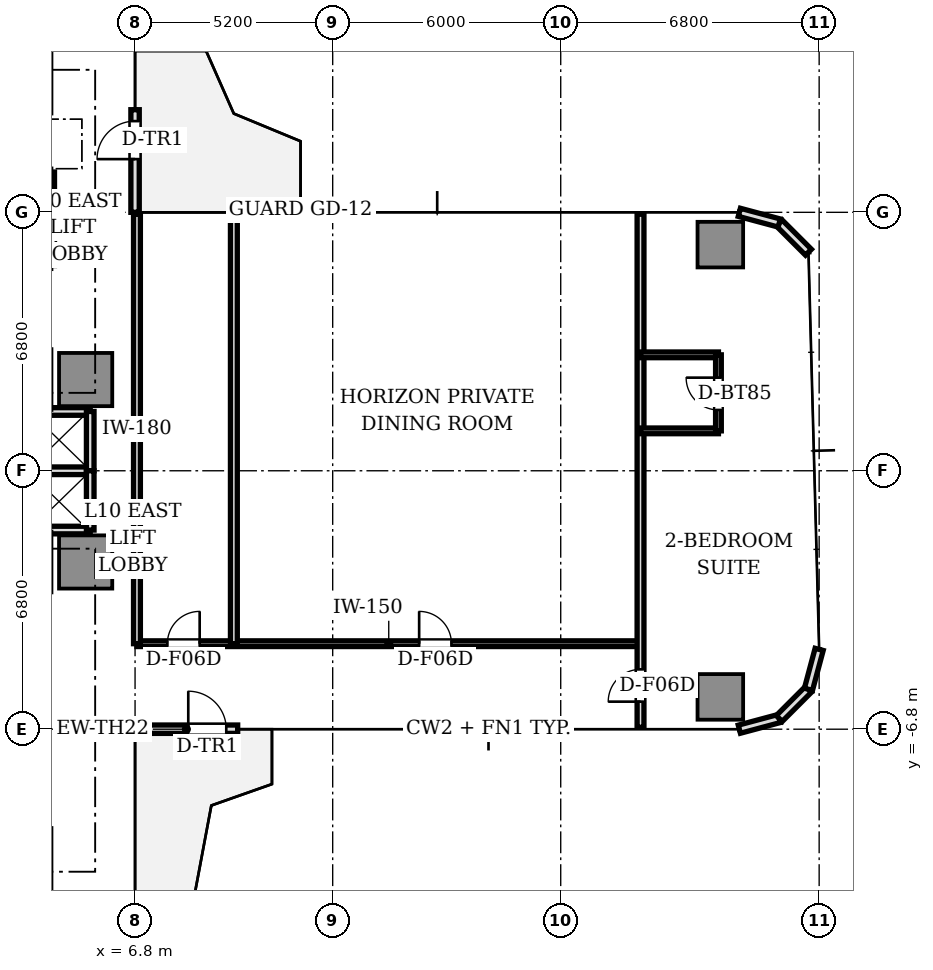
"""IFC4 building model, lengths in metres.
Left out: names, types, materials, properties, quantities, classifications, styles, units other than length and angle.
Written with IfcOpenShell. Run it as: python <this file> out.ifc"""

import sys

from ifc_helpers import new_model, si_unit, direction, frame, frame_2d, origin, origin_2d, place, context, subcontext, project, spatial, rectangle, extrude, source, transform, mapped, element, fill, save


model = new_model("IFC4")
c1 = context("Model", 3, precision=1e-05, world=origin(), true_north=direction((0.0, 1.0)))
c2 = subcontext(c1, "Body", "Model", "MODEL_VIEW")
j1 = project(units=[si_unit("LENGTHUNIT", "METRE"), si_unit("PLANEANGLEUNIT", "RADIAN")], contexts=[c1])
p1 = place(None, origin())
s1 = spatial("IfcSite", under=j1, at=p1, CompositionType="ELEMENT")
p2 = place(p1, origin())
s2 = spatial("IfcBuilding", under=s1, at=p2, CompositionType="ELEMENT")
p3 = place(p2, frame((0.0, 0.0, 39.85)))
s3 = spatial("IfcBuildingStorey", under=s2, at=p3, CompositionType="ELEMENT", Elevation=39.85)
m1 = source(origin(), c2, "Body", "SweptSolid", [
    extrude(rectangle(XDim=1.4, YDim=1.4, at=origin_2d()), origin(), (0.0, 0.0, 1.0), 3.11),
])
for number, where, z_axis, x_axis in (
    (1, (5.5, 2.4, 0.0), (0.0, 0.0, 1.0), (1.0, 0.0, 0.0)),
    (2, (5.5, -2.4, 0.0), (0.0, 0.0, 1.0), (1.0, 0.0, 0.0)),
):
    element("IfcColumn", number, at=place(p3, frame(where, z_axis=z_axis, x_axis=x_axis)), inside=s3, PredefinedType="COLUMN", context=c2, shape_type="MappedRepresentation", body=[
        mapped(m1, transform((0.0, 0.0, 0.0), scale=1.0)),
    ])
m2 = source(origin(), c2, "Body", "SweptSolid", [
    extrude(rectangle(XDim=1.2, YDim=1.2, at=origin_2d()), origin(), (0.0, 0.0, 1.0), 3.11),
])
for number, where, z_axis, x_axis in (
    (3, (22.2, -5.95, 0.0), (0.0, 0.0, 1.0), (1.0, 0.0, 0.0)),
    (4, (22.2, 5.95, 0.0), (0.0, 0.0, 1.0), (1.0, 0.0, 0.0)),
):
    element("IfcColumn", number, at=place(p3, frame(where, z_axis=z_axis, x_axis=x_axis)), inside=s3, PredefinedType="COLUMN", context=c2, shape_type="MappedRepresentation", body=[
        mapped(m2, transform((0.0, 0.0, 0.0), scale=1.0)),
    ])
p4 = place(p3, frame((6.8, -6.8, 0.0), z_axis=(0.0, 0.0, 1.0), x_axis=(1.0, 0.0, 0.0)))
e5 = element("IfcWall", 5, at=p4, inside=s3, PredefinedType="STANDARD", context=c2, shape_type="SweptSolid", body=[
    extrude(rectangle(XDim=2.7, YDim=0.22, at=frame_2d((1.35, 0.0))), origin(), (0.0, 0.0, 1.0), 3.11),
])
p5 = place(p4, frame((1.4, 0.0, 0.0)))
e6 = element("IfcOpeningElement", 6, at=p5, cuts=e5, PredefinedType="OPENING", context=c2, shape_type="SweptSolid", body=[
    extrude(rectangle(XDim=1.0, YDim=2.2, at=frame_2d((0.5, 1.1))), frame((0.0, 0.12, 0.0), z_axis=(0.0, -1.0, 0.0), x_axis=(1.0, 0.0, 0.0)), (0.0, 0.0, 1.0), 0.24),
])
for number, where, z_axis, x_axis in (
    (7, (22.7, -6.8, 0.0), (0.0, 0.0, 1.0), (0.966, 0.259, 0.0)),
    (8, (23.75, -6.519, 0.0), (0.0, 0.0, 1.0), (0.707, 0.707, 0.0)),
    (9, (24.519, -5.75, 0.0), (0.0, 0.0, 1.0), (0.259, 0.966, 0.0)),
    (10, (24.519, 5.75, 0.0), (0.0, 0.0, 1.0), (-0.707, 0.707, 0.0)),
    (11, (23.75, 6.519, 0.0), (0.0, 0.0, 1.0), (-0.966, 0.259, 0.0)),
):
    element("IfcWall", number, at=place(p3, frame(where, z_axis=z_axis, x_axis=x_axis)), inside=s3, PredefinedType="STANDARD", context=c2, shape_type="SweptSolid", body=[
        extrude(rectangle(XDim=1.087, YDim=0.22, at=frame_2d((0.543, 0.0))), origin(), (0.0, 0.0, 1.0), 3.11),
    ])
p6 = place(p3, frame((6.8, 6.8, 0.0), z_axis=(0.0, 0.0, 1.0), x_axis=(0.0, 1.0, 0.0)))
e12 = element("IfcWall", 12, at=p6, inside=s3, PredefinedType="STANDARD", context=c2, shape_type="SweptSolid", body=[
    extrude(rectangle(XDim=2.7, YDim=0.22, at=frame_2d((1.35, 0.0))), origin(), (0.0, 0.0, 1.0), 3.11),
])
p7 = place(p6, frame((1.4, 0.0, 0.0)))
e13 = element("IfcOpeningElement", 13, at=p7, cuts=e12, PredefinedType="OPENING", context=c2, shape_type="SweptSolid", body=[
    extrude(rectangle(XDim=1.0, YDim=2.2, at=frame_2d((0.5, 1.1))), frame((0.0, 0.12, 0.0), z_axis=(0.0, -1.0, 0.0), x_axis=(1.0, 0.0, 0.0)), (0.0, 0.0, 1.0), 0.24),
])
for number, where, z_axis, x_axis in (
    (14, (3.98, 1.56, 0.0), (0.0, 0.0, 1.0), (1.0, 0.0, 0.0)),
    (15, (3.98, -1.56, 0.0), (0.0, 0.0, 1.0), (1.0, 0.0, 0.0)),
    (16, (3.98, 0.0, 0.0), (0.0, 0.0, 1.0), (1.0, 0.0, 0.0)),
):
    element("IfcWall", number, at=place(p3, frame(where, z_axis=z_axis, x_axis=x_axis)), inside=s3, PredefinedType="SOLIDWALL", context=c2, shape_type="SweptSolid", body=[
        extrude(rectangle(XDim=1.64, YDim=0.2, at=frame_2d((0.82, 0.0))), origin(), (0.0, 0.0, 1.0), 2.66),
    ])
for number, where, z_axis, x_axis in (
    (17, (5.62, 0.0, 0.0), (0.0, 0.0, 1.0), (0.0, 1.0, 0.0)),
    (18, (5.62, -1.56, 0.0), (0.0, 0.0, 1.0), (0.0, 1.0, 0.0)),
):
    element("IfcWall", number, at=place(p3, frame(where, z_axis=z_axis, x_axis=x_axis)), inside=s3, PredefinedType="SOLIDWALL", context=c2, shape_type="SweptSolid", body=[
        extrude(rectangle(XDim=1.56, YDim=0.2, at=frame_2d((0.78, 0.0))), origin(), (0.0, 0.0, 1.0), 2.66),
    ])
p8 = place(p3, frame((4.58, 5.4, 0.0), z_axis=(0.0, 0.0, 1.0), x_axis=(0.0, 1.0, 0.0)))
e19 = element("IfcWall", 19, at=p8, inside=s3, PredefinedType="SOLIDWALL", context=c2, shape_type="SweptSolid", body=[
    extrude(rectangle(XDim=2.46, YDim=0.2, at=frame_2d((1.23, 0.0))), origin(), (0.0, 0.0, 1.0), 2.66),
])
p9 = place(p8, frame((0.55, 0.0, 0.0)))
e20 = element("IfcOpeningElement", 20, at=p9, cuts=e19, PredefinedType="OPENING", context=c2, shape_type="SweptSolid", body=[
    extrude(rectangle(XDim=0.85, YDim=2.1, at=frame_2d((0.425, 1.05))), frame((0.0, 0.11, 0.0), z_axis=(0.0, -1.0, 0.0), x_axis=(1.0, 0.0, 0.0)), (0.0, 0.0, 1.0), 0.22),
])
p10 = place(p3, frame((6.85, -4.55, 0.0), z_axis=(0.0, 0.0, 1.0), x_axis=(1.0, 0.0, 0.0)))
e21 = element("IfcWall", 21, at=p10, inside=s3, PredefinedType="PARTITIONING", context=c2, shape_type="SweptSolid", body=[
    extrude(rectangle(XDim=13.25, YDim=0.15, at=frame_2d((6.625, 0.0))), origin(), (0.0, 0.0, 1.0), 2.63),
])
p11 = place(p10, frame((0.8, 0.0, 0.0)))
e22 = element("IfcOpeningElement", 22, at=p11, cuts=e21, PredefinedType="OPENING", context=c2, shape_type="SweptSolid", body=[
    extrude(rectangle(XDim=0.85, YDim=2.1, at=frame_2d((0.425, 1.05))), frame((0.0, 0.085, 0.0), z_axis=(0.0, -1.0, 0.0), x_axis=(1.0, 0.0, 0.0)), (0.0, 0.0, 1.0), 0.17),
])
p12 = place(p10, frame((7.425, 0.0, 0.0)))
e23 = element("IfcOpeningElement", 23, at=p12, cuts=e21, PredefinedType="OPENING", context=c2, shape_type="SweptSolid", body=[
    extrude(rectangle(XDim=0.85, YDim=2.1, at=frame_2d((0.425, 1.05))), frame((0.0, 0.085, 0.0), z_axis=(0.0, -1.0, 0.0), x_axis=(1.0, 0.0, 0.0)), (0.0, 0.0, 1.0), 0.17),
])
for number, where, z_axis, x_axis in (
    (24, (6.85, -4.55, 0.0), (0.0, 0.0, 1.0), (0.0, 1.0, 0.0)),
    (25, (9.4, -4.55, 0.0), (0.0, 0.0, 1.0), (0.0, 1.0, 0.0)),
):
    element("IfcWall", number, at=place(p3, frame(where, z_axis=z_axis, x_axis=x_axis)), inside=s3, PredefinedType="PARTITIONING", context=c2, shape_type="SweptSolid", body=[
        extrude(rectangle(XDim=11.3, YDim=0.18, at=frame_2d((5.65, 0.0))), origin(), (0.0, 0.0, 1.0), 2.66),
    ])
p13 = place(p3, frame((20.1, -6.75, 0.0), z_axis=(0.0, 0.0, 1.0), x_axis=(0.0, 1.0, 0.0)))
e26 = element("IfcWall", 26, at=p13, inside=s3, PredefinedType="PARTITIONING", context=c2, shape_type="SweptSolid", body=[
    extrude(rectangle(XDim=13.5, YDim=0.18, at=frame_2d((6.75, 0.0))), origin(), (0.0, 0.0, 1.0), 2.66),
])
p14 = place(p13, frame((0.675, 0.0, 0.0)))
e27 = element("IfcOpeningElement", 27, at=p14, cuts=e26, PredefinedType="OPENING", context=c2, shape_type="SweptSolid", body=[
    extrude(rectangle(XDim=0.85, YDim=2.1, at=frame_2d((0.425, 1.05))), frame((0.0, 0.1, 0.0), z_axis=(0.0, -1.0, 0.0), x_axis=(1.0, 0.0, 0.0)), (0.0, 0.0, 1.0), 0.2),
])
p15 = place(p3, frame((20.1, 3.05, 0.0), z_axis=(0.0, 0.0, 1.0), x_axis=(1.0, 0.0, 0.0)))
e28 = element("IfcWall", 28, at=p15, inside=s3, PredefinedType="PARTITIONING", context=c2, shape_type="SweptSolid", body=[
    extrude(rectangle(XDim=2.05, YDim=0.15, at=frame_2d((1.025, 0.0))), origin(), (0.0, 0.0, 1.0), 2.63),
])
p16 = place(p3, frame((20.1, 1.05, 0.0), z_axis=(0.0, 0.0, 1.0), x_axis=(1.0, 0.0, 0.0)))
e29 = element("IfcWall", 29, at=p16, inside=s3, PredefinedType="PARTITIONING", context=c2, shape_type="SweptSolid", body=[
    extrude(rectangle(XDim=2.05, YDim=0.15, at=frame_2d((1.025, 0.0))), origin(), (0.0, 0.0, 1.0), 2.66),
])
p17 = place(p3, frame((22.15, 1.05, 0.0), z_axis=(0.0, 0.0, 1.0), x_axis=(0.0, 1.0, 0.0)))
e30 = element("IfcWall", 30, at=p17, inside=s3, PredefinedType="PARTITIONING", context=c2, shape_type="SweptSolid", body=[
    extrude(rectangle(XDim=2.0, YDim=0.15, at=frame_2d((1.0, 0.0))), origin(), (0.0, 0.0, 1.0), 2.58),
])
p18 = place(p17, frame((0.55, 0.0, 0.0)))
e31 = element("IfcOpeningElement", 31, at=p18, cuts=e30, PredefinedType="OPENING", context=c2, shape_type="SweptSolid", body=[
    extrude(rectangle(XDim=0.85, YDim=2.1, at=frame_2d((0.425, 1.05))), frame((0.0, 0.085, 0.0), z_axis=(0.0, -1.0, 0.0), x_axis=(1.0, 0.0, 0.0)), (0.0, 0.0, 1.0), 0.17),
])
m3 = source(origin(), c2, "Body", "SweptSolid", [
    extrude(rectangle(XDim=1.0, YDim=0.05, at=origin_2d()), origin(), (0.0, 0.0, 1.0), 2.2),
])
p19 = place(p5, frame((0.5, 0.0, 0.0)))
e32 = element("IfcDoor", 32, at=p19, inside=s3, OperationType="SINGLE_SWING_LEFT", PredefinedType="DOOR", context=c2, shape_type="MappedRepresentation", body=[
    mapped(m3, transform((0.0, 0.0, 0.0), scale=1.0)),
])
fill(e6, e32)
p20 = place(p7, frame((0.5, 0.0, 0.0)))
e33 = element("IfcDoor", 33, at=p20, inside=s3, OperationType="SINGLE_SWING_LEFT", PredefinedType="DOOR", context=c2, shape_type="MappedRepresentation", body=[
    mapped(m3, transform((0.0, 0.0, 0.0), scale=1.0)),
])
fill(e13, e33)
m4 = source(origin(), c2, "Body", "SweptSolid", [
    extrude(rectangle(XDim=0.85, YDim=0.05, at=origin_2d()), origin(), (0.0, 0.0, 1.0), 2.1),
])
p21 = place(p11, frame((0.425, 0.0, 0.0)))
e34 = element("IfcDoor", 34, at=p21, inside=s3, OperationType="SINGLE_SWING_RIGHT", PredefinedType="DOOR", context=c2, shape_type="MappedRepresentation", body=[
    mapped(m4, transform((0.0, 0.0, 0.0), scale=1.0)),
])
fill(e22, e34)
p22 = place(p12, frame((0.425, 0.0, 0.0)))
e35 = element("IfcDoor", 35, at=p22, inside=s3, OperationType="SINGLE_SWING_LEFT", PredefinedType="DOOR", context=c2, shape_type="MappedRepresentation", body=[
    mapped(m4, transform((0.0, 0.0, 0.0), scale=1.0)),
])
fill(e23, e35)
p23 = place(p18, frame((0.425, 0.0, 0.0)))
e36 = element("IfcDoor", 36, at=p23, inside=s3, OperationType="SINGLE_SWING_RIGHT", PredefinedType="DOOR", context=c2, shape_type="MappedRepresentation", body=[
    mapped(m4, transform((0.0, 0.0, 0.0), scale=1.0)),
])
fill(e31, e36)
p24 = place(p14, frame((0.425, 0.0, 0.0)))
e37 = element("IfcDoor", 37, at=p24, inside=s3, OperationType="SINGLE_SWING_LEFT", PredefinedType="DOOR", context=c2, shape_type="MappedRepresentation", body=[
    mapped(m4, transform((0.0, 0.0, 0.0), scale=1.0)),
])
fill(e27, e37)
save(model, sys.argv[1])
